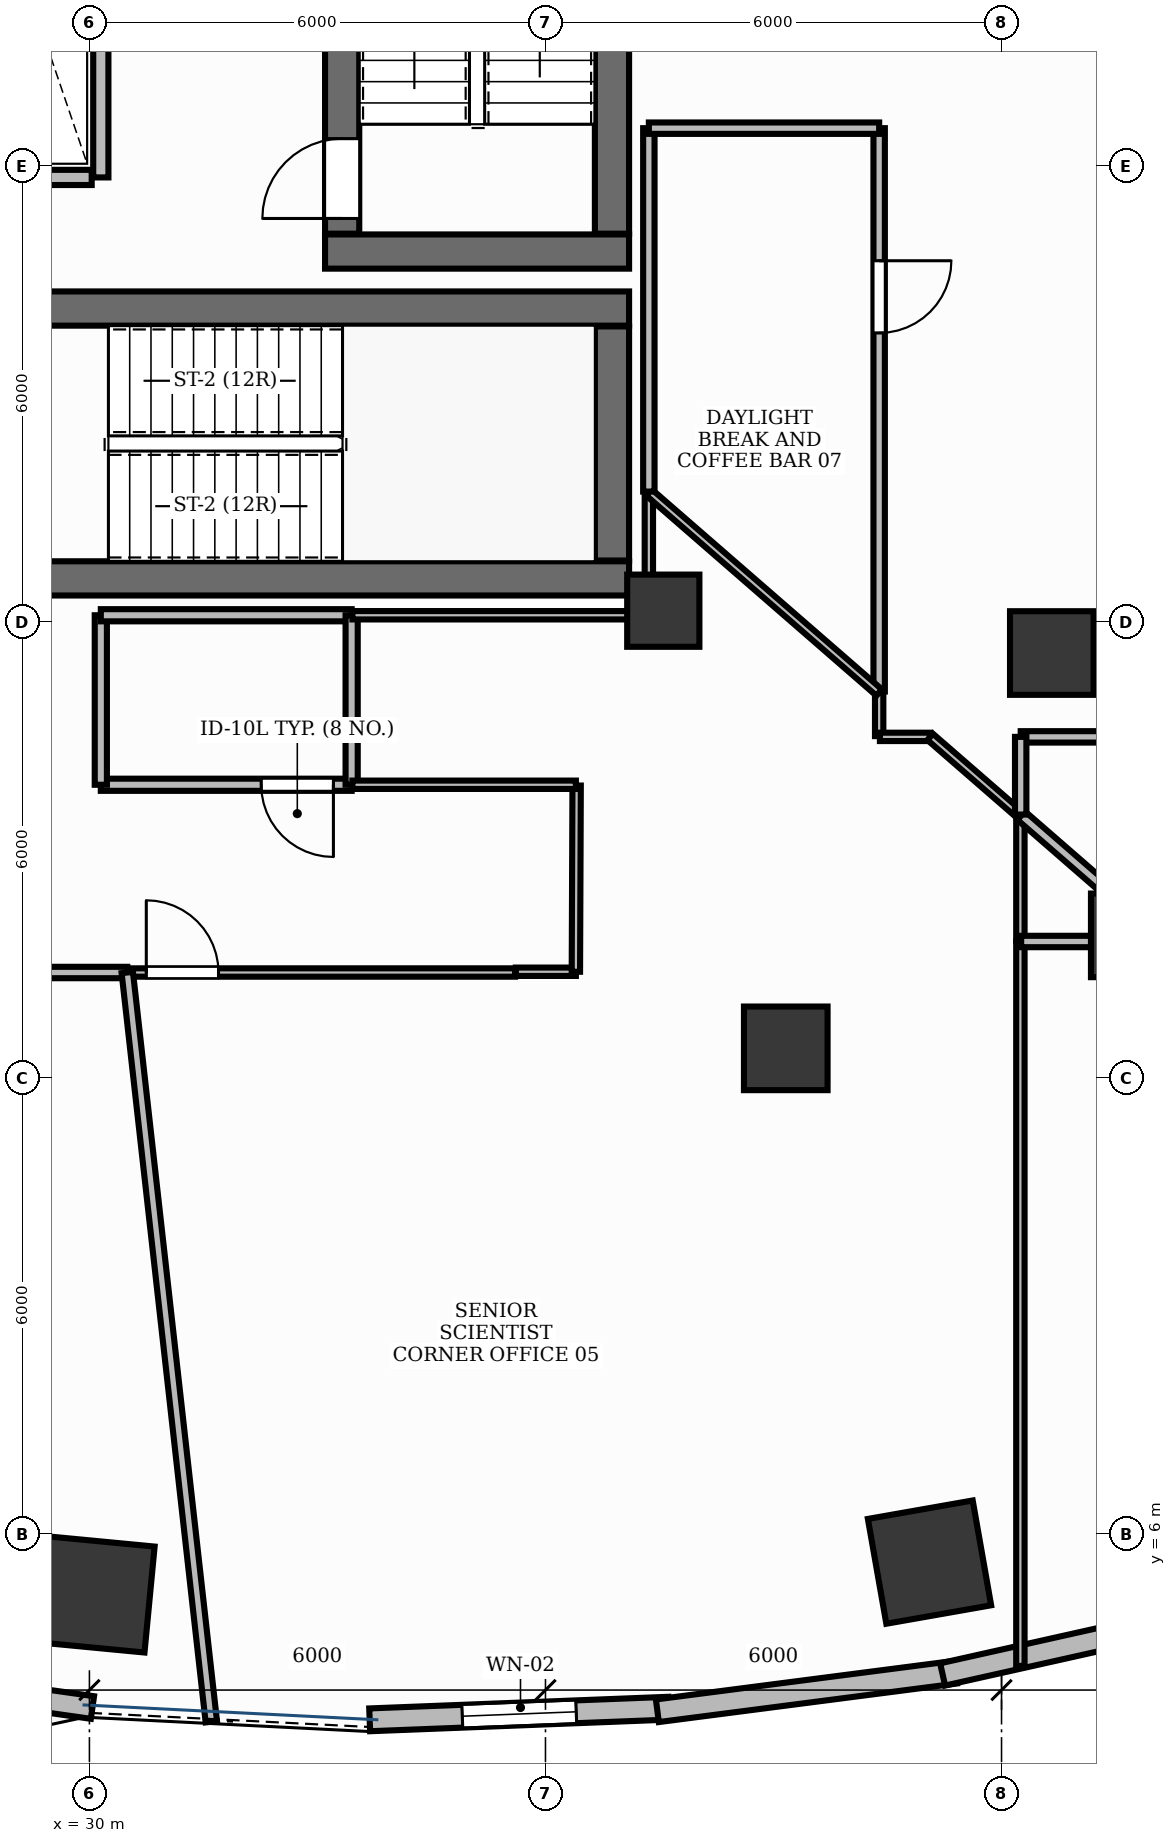
"""IFC4 building model, lengths in metres.
Left out: names, types, materials, properties, quantities, classifications, styles, units other than length and angle.
Written with IfcOpenShell. Run it as: python <this file> out.ifc"""

import sys

from ifc_helpers import new_model, si_unit, direction, frame, frame_2d, origin, origin_2d, place, context, subcontext, project, spatial, rectangle, extrude, element, fill, save


model = new_model("IFC4")
c1 = context("Model", 3, precision=1e-05, world=origin(), true_north=direction((0.0, 1.0)))
c2 = subcontext(c1, "Body", "Model", "MODEL_VIEW")
j1 = project(units=[si_unit("LENGTHUNIT", "METRE"), si_unit("PLANEANGLEUNIT", "RADIAN")], contexts=[c1])
p1 = place(None, origin())
s1 = spatial("IfcSite", under=j1, at=p1, CompositionType="ELEMENT")
p2 = place(p1, origin())
s2 = spatial("IfcBuilding", under=s1, at=p2, CompositionType="ELEMENT")
p3 = place(p2, frame((0.0, 0.0, 72.0)))
s3 = spatial("IfcBuildingStorey", under=s2, at=p3, CompositionType="ELEMENT", Elevation=72.0)
p4 = place(p3, frame((28.852, 18.575, 0.0), z_axis=(0.0, 0.0, 1.0), x_axis=(1.0, 0.0, 0.0)))
e1 = element("IfcWall", 1, at=p4, inside=s3, PredefinedType="SHEAR", context=c2, shape_type="SweptSolid", body=[
    extrude(rectangle(XDim=8.248, YDim=0.45, at=frame_2d((4.124, 0.0))), origin(), (0.0, 0.0, 1.0), 3.9),
])
p5 = place(p3, frame((28.35, 22.125, 0.0), z_axis=(0.0, 0.0, 1.0), x_axis=(1.0, 0.0, 0.0)))
e2 = element("IfcWall", 2, at=p5, inside=s3, PredefinedType="SHEAR", context=c2, shape_type="SweptSolid", body=[
    extrude(rectangle(XDim=8.75, YDim=0.45, at=frame_2d((4.375, 0.0))), origin(), (0.0, 0.0, 1.0), 3.9),
])
p6 = place(p3, frame((36.875, 18.81, 0.0), z_axis=(0.0, 0.0, 1.0), x_axis=(0.0, 1.0, 0.0)))
e3 = element("IfcWall", 3, at=p6, inside=s3, PredefinedType="SHEAR", context=c2, shape_type="SweptSolid", body=[
    extrude(rectangle(XDim=3.08, YDim=0.45, at=frame_2d((1.54, 0.0))), origin(), (0.0, 0.0, 1.0), 3.9),
])
p7 = place(p3, frame((33.1, 22.875, 0.0), z_axis=(0.0, 0.0, 1.0), x_axis=(1.0, 0.0, 0.0)))
e4 = element("IfcWall", 4, at=p7, inside=s3, PredefinedType="SHEAR", context=c2, shape_type="SweptSolid", body=[
    extrude(rectangle(XDim=4.0, YDim=0.45, at=frame_2d((2.0, 0.0))), origin(), (0.0, 0.0, 1.0), 3.9),
])
p8 = place(p3, frame((36.875, 23.11, 0.0), z_axis=(0.0, 0.0, 1.0), x_axis=(0.0, 1.0, 0.0)))
e5 = element("IfcWall", 5, at=p8, inside=s3, PredefinedType="SHEAR", context=c2, shape_type="SweptSolid", body=[
    extrude(rectangle(XDim=7.78, YDim=0.45, at=frame_2d((3.89, 0.0))), origin(), (0.0, 0.0, 1.0), 3.9),
])
p9 = place(p3, frame((33.325, 23.11, 0.0), z_axis=(0.0, 0.0, 1.0), x_axis=(0.0, 1.0, 0.0)))
e6 = element("IfcWall", 6, at=p9, inside=s3, PredefinedType="SHEAR", context=c2, shape_type="SweptSolid", body=[
    extrude(rectangle(XDim=7.78, YDim=0.45, at=frame_2d((3.89, 0.0))), origin(), (0.0, 0.0, 1.0), 3.9),
])
p10 = place(p9, frame((0.2, 0.0, 0.0)))
e7 = element("IfcOpeningElement", 7, at=p10, cuts=e6, PredefinedType="OPENING", context=c2, shape_type="SweptSolid", body=[
    extrude(rectangle(XDim=1.05, YDim=2.15, at=frame_2d((0.525, 1.075))), frame((0.0, 0.24, 0.0), z_axis=(0.0, -1.0, 0.0), x_axis=(1.0, 0.0, 0.0)), (0.0, 0.0, 1.0), 0.48),
])
p11 = place(p3, frame((37.55, 18.15, -0.0), z_axis=(0.0, 0.0, 1.0), x_axis=(1.0, 0.0, 0.0)))
e8 = element("IfcColumn", 8, at=p11, inside=s3, PredefinedType="PILASTER", context=c2, shape_type="SweptSolid", body=[
    extrude(rectangle(XDim=0.95, YDim=0.95, at=origin_2d()), origin(), (0.0, 0.0, 1.0), 3.901),
])
for number, where, z_axis, x_axis in (
    (9, (30.094, 5.208, -0.0), (0.0, 0.0, 1.0), (-0.995, 0.095, 0.0)),
    (10, (41.052, 5.633, -0.0), (0.0, 0.0, 1.0), (0.985, 0.173, 0.0)),
):
    element("IfcColumn", number, at=place(p3, frame(where, z_axis=z_axis, x_axis=x_axis)), inside=s3, PredefinedType="COLUMN", context=c2, shape_type="SweptSolid", body=[
        extrude(rectangle(XDim=1.4, YDim=1.4, at=origin_2d()), origin(), (0.0, 0.0, 1.0), 3.901),
    ])
for number, where, z_axis, x_axis in (
    (11, (39.161, 12.392, -0.0), (0.0, 0.0, 1.0), (1.0, 0.0, 0.0)),
    (12, (43.727, 13.879, -0.0), (0.0, 0.0, 1.0), (1.0, 0.0, 0.0)),
    (13, (42.662, 17.593, -0.0), (0.0, 0.0, 1.0), (1.0, 0.0, 0.0)),
):
    element("IfcColumn", number, at=place(p3, frame(where, z_axis=z_axis, x_axis=x_axis)), inside=s3, PredefinedType="COLUMN", context=c2, shape_type="SweptSolid", body=[
        extrude(rectangle(XDim=1.1, YDim=1.1, at=origin_2d()), origin(), (0.0, 0.0, 1.0), 3.901),
    ])
p12 = place(p3, frame((33.687, 3.558, 0.0), z_axis=(0.0, 0.0, 1.0), x_axis=(0.999247008469, 0.038799691558, 0.0)))
e14 = element("IfcWall", 14, at=p12, inside=s3, PredefinedType="STANDARD", context=c2, shape_type="SweptSolid", body=[
    extrude(rectangle(XDim=3.939, YDim=0.3, at=frame_2d((1.969, 0.0))), origin(), (0.0, 0.0, 1.0), 3.9),
])
p13 = place(p12, frame((1.219, 0.0, 0.95)))
e15 = element("IfcOpeningElement", 15, at=p13, cuts=e14, PredefinedType="OPENING", context=c2, shape_type="SweptSolid", body=[
    extrude(rectangle(XDim=1.5, YDim=1.8, at=frame_2d((0.75, 0.9))), frame((0.0, 0.165, 0.0), z_axis=(0.0, -1.0, 0.0), x_axis=(1.0, 0.0, 0.0)), (0.0, 0.0, 1.0), 0.33),
])
p14 = place(p3, frame((26.128, 4.273, 0.0), z_axis=(0.0, 0.0, 1.0), x_axis=(0.990165832998, -0.139898617443, 0.0)))
e16 = element("IfcWall", 16, at=p14, inside=s3, PredefinedType="STANDARD", context=c2, shape_type="SweptSolid", body=[
    extrude(rectangle(XDim=3.951, YDim=0.3, at=frame_2d((1.976, 0.0))), origin(), (0.0, 0.0, 1.0), 3.47),
])
p15 = place(p3, frame((37.472, 3.678, 0.0), z_axis=(0.0, 0.0, 1.0), x_axis=(0.991734095036, 0.128310111617, 0.0)))
e17 = element("IfcWall", 17, at=p15, inside=s3, PredefinedType="STANDARD", context=c2, shape_type="SweptSolid", body=[
    extrude(rectangle(XDim=3.956, YDim=0.3, at=frame_2d((1.978, 0.0))), origin(), (0.0, 0.0, 1.0), 3.9),
])
p16 = place(p3, frame((41.225, 4.155, 0.0), z_axis=(0.0, 0.0, 1.0), x_axis=(0.975868573345, 0.218358713032, 0.0)))
e18 = element("IfcWall", 18, at=p16, inside=s3, PredefinedType="STANDARD", context=c2, shape_type="SweptSolid", body=[
    extrude(rectangle(XDim=3.909, YDim=0.3, at=frame_2d((1.954, 0.0))), origin(), (0.0, 0.0, 1.0), 3.9),
])
p17 = place(p3, frame((30.15, 23.85, 0.0), z_axis=(0.0, 0.0, 1.0), x_axis=(0.0, 1.0, 0.0)))
e19 = element("IfcWall", 19, at=p17, inside=s3, PredefinedType="PARTITIONING", context=c2, shape_type="SweptSolid", body=[
    extrude(rectangle(XDim=6.35, YDim=0.2, at=frame_2d((3.175, 0.0))), origin(), (0.0, 0.0, 1.0), 2.91),
])
p18 = place(p3, frame((27.934, 23.85, 0.0), z_axis=(0.0, 0.0, 1.0), x_axis=(1.0, 0.0, 0.0)))
e20 = element("IfcWall", 20, at=p18, inside=s3, PredefinedType="PARTITIONING", context=c2, shape_type="SweptSolid", body=[
    extrude(rectangle(XDim=2.096, YDim=0.2, at=frame_2d((1.048, 0.0))), origin(), (0.0, 0.0, 1.0), 2.91),
])
p19 = place(p3, frame((33.45, 15.86, 0.0), z_axis=(0.0, 0.0, 1.0), x_axis=(-1.0, 0.0, 0.0)))
e21 = element("IfcWall", 21, at=p19, inside=s3, PredefinedType="PARTITIONING", context=c2, shape_type="SweptSolid", body=[
    extrude(rectangle(XDim=3.3, YDim=0.16, at=frame_2d((1.65, 0.0))), origin(), (0.0, 0.0, 1.0), 2.91),
])
p20 = place(p19, frame((0.24, 0.0, 0.0)))
e22 = element("IfcOpeningElement", 22, at=p20, cuts=e21, PredefinedType="OPENING", context=c2, shape_type="SweptSolid", body=[
    extrude(rectangle(XDim=0.95, YDim=2.15, at=frame_2d((0.475, 1.075))), frame((0.0, 0.095, 0.0), z_axis=(0.0, -1.0, 0.0), x_axis=(1.0, 0.0, 0.0)), (0.0, 0.0, 1.0), 0.19),
])
p21 = place(p3, frame((30.508, 13.39, 0.0), z_axis=(0.0, 0.0, 1.0), x_axis=(1.0, 0.0, 0.0)))
e23 = element("IfcWall", 23, at=p21, inside=s3, PredefinedType="MOVABLE", context=c2, shape_type="SweptSolid", body=[
    extrude(rectangle(XDim=5.092, YDim=0.11, at=frame_2d((2.546, 0.0))), origin(), (0.0, 0.0, 1.0), 2.91),
])
p22 = place(p21, frame((0.24, 0.0, 0.0)))
e24 = element("IfcOpeningElement", 24, at=p22, cuts=e23, PredefinedType="OPENING", context=c2, shape_type="SweptSolid", body=[
    extrude(rectangle(XDim=0.95, YDim=2.15, at=frame_2d((0.475, 1.075))), frame((0.0, 0.07, 0.0), z_axis=(0.0, -1.0, 0.0), x_axis=(1.0, 0.0, 0.0)), (0.0, 0.0, 1.0), 0.14),
])
p23 = place(p3, frame((40.39, 24.498, 0.0), z_axis=(0.0, 0.0, 1.0), x_axis=(0.0, -1.0, 0.0)))
e25 = element("IfcWall", 25, at=p23, inside=s3, PredefinedType="PARTITIONING", context=c2, shape_type="SweptSolid", body=[
    extrude(rectangle(XDim=7.412, YDim=0.15, at=frame_2d((3.706, 0.0))), origin(), (0.0, 0.0, 1.0), 2.91),
])
p24 = place(p23, frame((1.744, 0.0, 0.0)))
e26 = element("IfcOpeningElement", 26, at=p24, cuts=e25, PredefinedType="OPENING", context=c2, shape_type="SweptSolid", body=[
    extrude(rectangle(XDim=0.95, YDim=2.15, at=frame_2d((0.475, 1.075))), frame((0.0, 0.09, 0.0), z_axis=(0.0, -1.0, 0.0), x_axis=(1.0, 0.0, 0.0)), (0.0, 0.0, 1.0), 0.18),
])
p25 = place(p3, frame((30.15, 15.86, 0.0), z_axis=(0.0, 0.0, 1.0), x_axis=(0.0, 1.0, 0.0)))
e27 = element("IfcWall", 27, at=p25, inside=s3, PredefinedType="PARTITIONING", context=c2, shape_type="SweptSolid", body=[
    extrude(rectangle(XDim=2.23, YDim=0.16, at=frame_2d((1.115, 0.0))), origin(), (0.0, 0.0, 1.0), 2.91),
])
p26 = place(p3, frame((30.15, 18.09, 0.0), z_axis=(0.0, 0.0, 1.0), x_axis=(1.0, 0.0, 0.0)))
e28 = element("IfcWall", 28, at=p26, inside=s3, PredefinedType="PARTITIONING", context=c2, shape_type="SweptSolid", body=[
    extrude(rectangle(XDim=3.3, YDim=0.16, at=frame_2d((1.65, 0.0))), origin(), (0.0, 0.0, 1.0), 2.91),
])
p27 = place(p3, frame((33.45, 18.09, 0.0), z_axis=(0.0, 0.0, 1.0), x_axis=(0.0, -1.0, 0.0)))
e29 = element("IfcWall", 29, at=p27, inside=s3, PredefinedType="PARTITIONING", context=c2, shape_type="SweptSolid", body=[
    extrude(rectangle(XDim=2.23, YDim=0.16, at=frame_2d((1.115, 0.0))), origin(), (0.0, 0.0, 1.0), 2.91),
])
p28 = place(p3, frame((28.5, 13.39, 0.0), z_axis=(0.0, 0.0, 1.0), x_axis=(1.0, 0.0, 0.0)))
e30 = element("IfcWall", 30, at=p28, inside=s3, PredefinedType="PARTITIONING", context=c2, shape_type="SweptSolid", body=[
    extrude(rectangle(XDim=1.998, YDim=0.15, at=frame_2d((0.999, 0.0))), origin(), (0.0, 0.0, 1.0), 2.91),
])
p29 = place(p3, frame((30.498, 13.39, 0.0), z_axis=(0.0, 0.0, 1.0), x_axis=(0.11147423436, -0.993767324414, 0.0)))
e31 = element("IfcWall", 31, at=p29, inside=s3, PredefinedType="PARTITIONING", context=c2, shape_type="SweptSolid", body=[
    extrude(rectangle(XDim=9.919, YDim=0.15, at=frame_2d((4.959, 0.0))), origin(), (0.0, 0.0, 1.0), 2.91),
])
p30 = place(p3, frame((40.39, 17.073, 0.0), z_axis=(0.0, 0.0, 1.0), x_axis=(0.0, -1.0, 0.0)))
e32 = element("IfcWall", 32, at=p30, inside=s3, PredefinedType="MOVABLE", context=c2, shape_type="SweptSolid", body=[
    extrude(rectangle(XDim=0.573, YDim=0.11, at=frame_2d((0.287, 0.0))), origin(), (0.0, 0.0, 1.0), 2.91),
])
p31 = place(p3, frame((40.4, 16.49, 0.0), z_axis=(0.0, 0.0, 1.0), x_axis=(1.0, 0.0, 0.0)))
e33 = element("IfcWall", 33, at=p31, inside=s3, PredefinedType="MOVABLE", context=c2, shape_type="SweptSolid", body=[
    extrude(rectangle(XDim=0.661, YDim=0.11, at=frame_2d((0.331, 0.0))), origin(), (0.0, 0.0, 1.0), 2.91),
])
p32 = place(p3, frame((41.061, 16.49, 0.0), z_axis=(0.0, 0.0, 1.0), x_axis=(0.754745866839, -0.656017283682, 0.0)))
e34 = element("IfcWall", 34, at=p32, inside=s3, PredefinedType="MOVABLE", context=c2, shape_type="SweptSolid", body=[
    extrude(rectangle(XDim=1.573, YDim=0.11, at=frame_2d((0.786, 0.0))), origin(), (0.0, 0.0, 1.0), 2.91),
])
p33 = place(p3, frame((42.248, 15.458, 0.0), z_axis=(0.0, 0.0, 1.0), x_axis=(0.0, -1.0, 0.0)))
e35 = element("IfcWall", 35, at=p33, inside=s3, PredefinedType="MOVABLE", context=c2, shape_type="SweptSolid", body=[
    extrude(rectangle(XDim=1.656, YDim=0.11, at=frame_2d((0.828, 0.0))), origin(), (0.0, 0.0, 1.0), 2.91),
])
p34 = place(p3, frame((42.248, 13.798, 0.0), z_axis=(0.0, 0.0, 1.0), x_axis=(0.0, -1.0, 0.0)))
e36 = element("IfcWall", 36, at=p34, inside=s3, PredefinedType="MOVABLE", context=c2, shape_type="SweptSolid", body=[
    extrude(rectangle(XDim=9.53, YDim=0.11, at=frame_2d((4.765, 0.0))), origin(), (0.0, 0.0, 1.0), 2.91),
])
p35 = place(p3, frame((35.61, 13.4, 0.0), z_axis=(0.0, 0.0, 1.0), x_axis=(1.0, 0.0, 0.0)))
e37 = element("IfcWall", 37, at=p35, inside=s3, PredefinedType="MOVABLE", context=c2, shape_type="SweptSolid", body=[
    extrude(rectangle(XDim=0.79, YDim=0.11, at=frame_2d((0.395, 0.0))), origin(), (0.0, 0.0, 1.0), 2.91),
])
p36 = place(p3, frame((36.4, 13.4, 0.0), z_axis=(0.0, 0.0, 1.0), x_axis=(0.004085258855, 0.999991655295, 0.0)))
e38 = element("IfcWall", 38, at=p36, inside=s3, PredefinedType="MOVABLE", context=c2, shape_type="SweptSolid", body=[
    extrude(rectangle(XDim=2.45, YDim=0.11, at=frame_2d((1.225, 0.0))), origin(), (0.0, 0.0, 1.0), 2.91),
])
p37 = place(p3, frame((36.4, 15.86, 0.0), z_axis=(0.0, 0.0, 1.0), x_axis=(-1.0, 0.0, 0.0)))
e39 = element("IfcWall", 39, at=p37, inside=s3, PredefinedType="MOVABLE", context=c2, shape_type="SweptSolid", body=[
    extrude(rectangle(XDim=2.94, YDim=0.11, at=frame_2d((1.47, 0.0))), origin(), (0.0, 0.0, 1.0), 2.91),
])
p38 = place(p3, frame((33.46, 18.09, 0.0), z_axis=(0.0, 0.0, 1.0), x_axis=(1.0, 0.0, 0.0)))
e40 = element("IfcWall", 40, at=p38, inside=s3, PredefinedType="MOVABLE", context=c2, shape_type="SweptSolid", body=[
    extrude(rectangle(XDim=3.89, YDim=0.11, at=frame_2d((1.945, 0.0))), origin(), (0.0, 0.0, 1.0), 2.91),
])
p39 = place(p3, frame((37.36, 18.1, 0.0), z_axis=(0.0, 0.0, 1.0), x_axis=(0.0, 1.0, 0.0)))
e41 = element("IfcWall", 41, at=p39, inside=s3, PredefinedType="MOVABLE", context=c2, shape_type="SweptSolid", body=[
    extrude(rectangle(XDim=1.607, YDim=0.11, at=frame_2d((0.804, 0.0))), origin(), (0.0, 0.0, 1.0), 2.91),
])
p40 = place(p3, frame((37.36, 19.707, 0.0), z_axis=(0.0, 0.0, 1.0), x_axis=(0.754674904971, -0.656098916175, 0.0)))
e42 = element("IfcWall", 42, at=p40, inside=s3, PredefinedType="MOVABLE", context=c2, shape_type="SweptSolid", body=[
    extrude(rectangle(XDim=4.015, YDim=0.11, at=frame_2d((2.007, 0.0))), origin(), (0.0, 0.0, 1.0), 2.91),
])
p41 = place(p3, frame((42.252, 16.49, 0.0), z_axis=(0.0, 0.0, 1.0), x_axis=(1.0, 0.0, 0.0)))
e43 = element("IfcWall", 43, at=p41, inside=s3, PredefinedType="PARTITIONING", context=c2, shape_type="SweptSolid", body=[
    extrude(rectangle(XDim=1.948, YDim=0.15, at=frame_2d((0.974, 0.0))), origin(), (0.0, 0.0, 1.0), 2.91),
])
p42 = place(p3, frame((42.258, 13.798, 0.0), z_axis=(0.0, 0.0, 1.0), x_axis=(1.0, 0.0, 0.0)))
e44 = element("IfcWall", 44, at=p42, inside=s3, PredefinedType="PARTITIONING", context=c2, shape_type="SweptSolid", body=[
    extrude(rectangle(XDim=1.895, YDim=0.15, at=frame_2d((0.948, 0.0))), origin(), (0.0, 0.0, 1.0), 2.91),
])
p43 = place(p3, frame((44.156, 13.805, 0.0), z_axis=(0.0, 0.0, 1.0), x_axis=(-0.754707936706, 0.656060919635, 0.0)))
e45 = element("IfcWall", 45, at=p43, inside=s3, PredefinedType="PARTITIONING", context=c2, shape_type="SweptSolid", body=[
    extrude(rectangle(XDim=2.514, YDim=0.15, at=frame_2d((1.257, 0.0))), origin(), (0.0, 0.0, 1.0), 2.91),
])
p44 = place(p3, frame((42.252, 15.468, 0.0), z_axis=(0.0, 0.0, 1.0), x_axis=(0.0, 1.0, 0.0)))
e46 = element("IfcWall", 46, at=p44, inside=s3, PredefinedType="PARTITIONING", context=c2, shape_type="SweptSolid", body=[
    extrude(rectangle(XDim=1.022, YDim=0.15, at=frame_2d((0.511, 0.0))), origin(), (0.0, 0.0, 1.0), 2.91),
])
p45 = place(p3, frame((37.36, 19.717, 0.0), z_axis=(0.0, 0.0, 1.0), x_axis=(0.0, 1.0, 0.0)))
e47 = element("IfcWall", 47, at=p45, inside=s3, PredefinedType="PARTITIONING", context=c2, shape_type="SweptSolid", body=[
    extrude(rectangle(XDim=4.781, YDim=0.15, at=frame_2d((2.39, 0.0))), origin(), (0.0, 0.0, 1.0), 2.91),
])
p46 = place(p3, frame((37.36, 24.498, 0.0), z_axis=(0.0, 0.0, 1.0), x_axis=(1.0, 0.0, 0.0)))
e48 = element("IfcWall", 48, at=p46, inside=s3, PredefinedType="PARTITIONING", context=c2, shape_type="SweptSolid", body=[
    extrude(rectangle(XDim=3.03, YDim=0.15, at=frame_2d((1.515, 0.0))), origin(), (0.0, 0.0, 1.0), 2.91),
])
p47 = place(p13, origin())
e49 = element("IfcWindow", 49, at=p47, inside=s3, PartitioningType="DOUBLE_PANEL_VERTICAL", PredefinedType="WINDOW", context=c2, shape_type="SweptSolid", body=[
    extrude(rectangle(XDim=1.5, YDim=1.8, at=frame_2d((0.75, 0.9))), frame((0.0, 0.03, 0.0), z_axis=(0.0, -1.0, 0.0), x_axis=(1.0, 0.0, 0.0)), (0.0, 0.0, 1.0), 0.06),
])
fill(e15, e49)
p48 = place(p10, origin())
e50 = element("IfcDoor", 50, at=p48, inside=s3, OperationType="SINGLE_SWING_LEFT", PredefinedType="DOOR", context=c2, shape_type="SweptSolid", body=[
    extrude(rectangle(XDim=1.05, YDim=2.15, at=frame_2d((0.525, 1.075))), frame((0.0, 0.025, 0.0), z_axis=(0.0, -1.0, 0.0), x_axis=(1.0, 0.0, 0.0)), (0.0, 0.0, 1.0), 0.05),
])
fill(e7, e50)
p49 = place(p20, origin())
e51 = element("IfcDoor", 51, at=p49, inside=s3, OperationType="SINGLE_SWING_LEFT", PredefinedType="DOOR", context=c2, shape_type="SweptSolid", body=[
    extrude(rectangle(XDim=0.95, YDim=2.15, at=frame_2d((0.475, 1.075))), frame((0.0, 0.025, 0.0), z_axis=(0.0, -1.0, 0.0), x_axis=(1.0, 0.0, 0.0)), (0.0, 0.0, 1.0), 0.05),
])
fill(e22, e51)
p50 = place(p22, origin())
e52 = element("IfcDoor", 52, at=p50, inside=s3, OperationType="SINGLE_SWING_LEFT", PredefinedType="DOOR", context=c2, shape_type="SweptSolid", body=[
    extrude(rectangle(XDim=0.95, YDim=2.15, at=frame_2d((0.475, 1.075))), frame((0.0, 0.025, 0.0), z_axis=(0.0, -1.0, 0.0), x_axis=(1.0, 0.0, 0.0)), (0.0, 0.0, 1.0), 0.05),
])
fill(e24, e52)
p51 = place(p24, origin())
e53 = element("IfcDoor", 53, at=p51, inside=s3, OperationType="SINGLE_SWING_LEFT", PredefinedType="DOOR", context=c2, shape_type="SweptSolid", body=[
    extrude(rectangle(XDim=0.95, YDim=2.15, at=frame_2d((0.475, 1.075))), frame((0.0, 0.025, 0.0), z_axis=(0.0, -1.0, 0.0), x_axis=(1.0, 0.0, 0.0)), (0.0, 0.0, 1.0), 0.05),
])
fill(e26, e53)
save(model, sys.argv[1])
